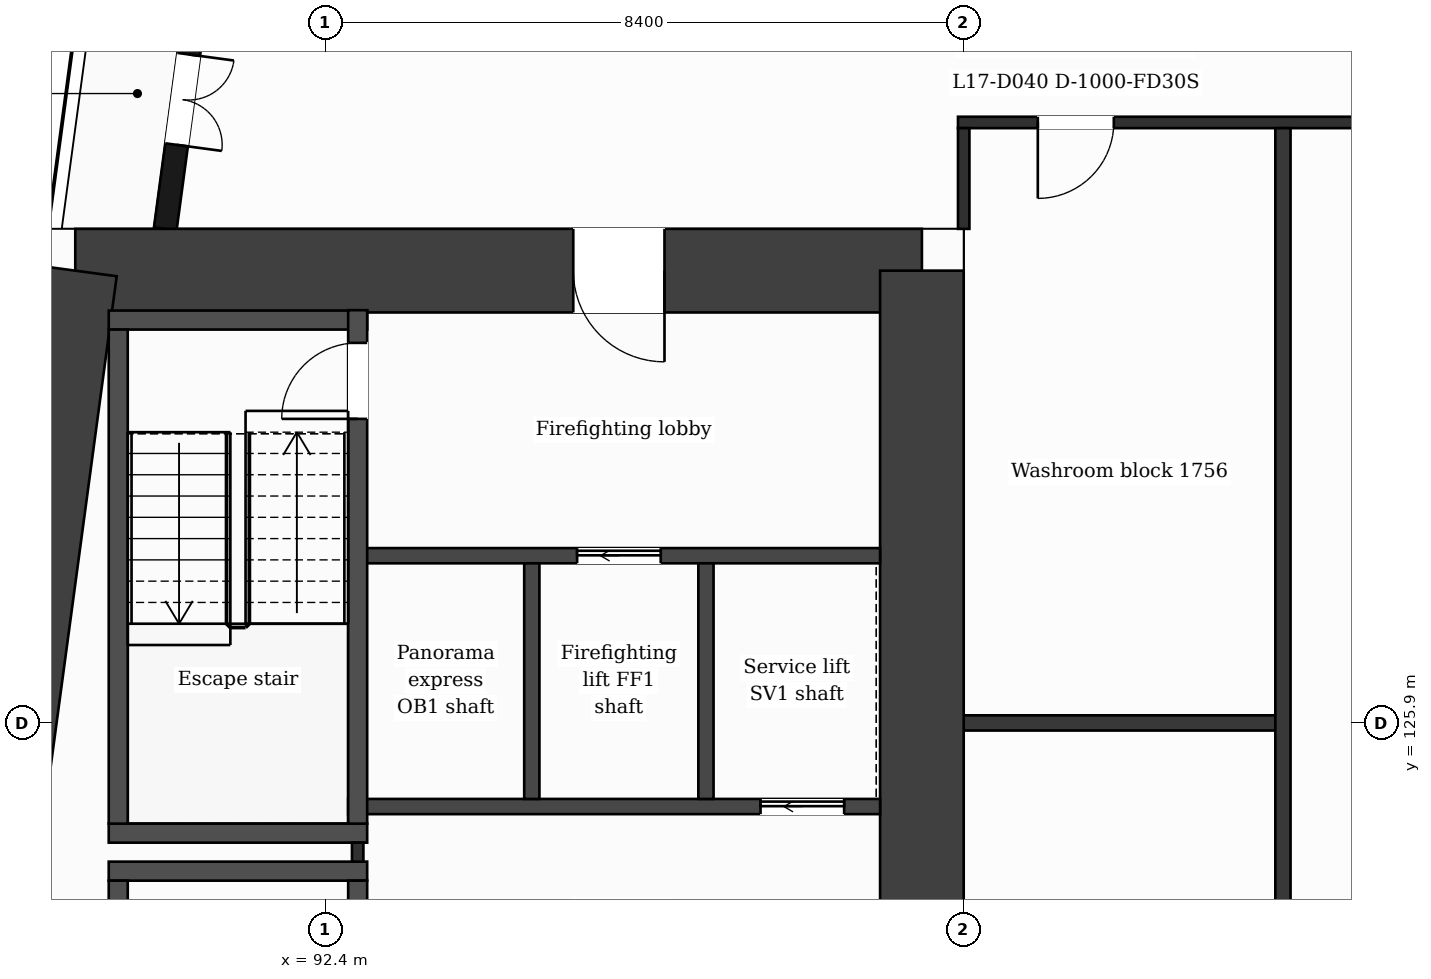
"""IFC4 building model, lengths in metres.
Left out: names, types, materials, properties, quantities, classifications, styles, units other than length and angle.
Written with IfcOpenShell. Run it as: python <this file> out.ifc"""

import sys

from ifc_helpers import new_model, si_unit, direction, frame, frame_2d, origin, place, context, subcontext, project, spatial, rectangle, extrude, element, fill, save


model = new_model("IFC4")
c1 = context("Model", 3, precision=1e-05, world=origin(), true_north=direction((0.0, 1.0)))
c2 = subcontext(c1, "Body", "Model", "MODEL_VIEW")
j1 = project(units=[si_unit("LENGTHUNIT", "METRE"), si_unit("PLANEANGLEUNIT", "RADIAN")], contexts=[c1])
p1 = place(None, origin())
s1 = spatial("IfcSite", under=j1, at=p1, CompositionType="ELEMENT")
p2 = place(p1, origin())
s2 = spatial("IfcBuilding", under=s1, at=p2, CompositionType="ELEMENT")
p3 = place(p2, frame((0.0, 0.0, 77.5)))
s3 = spatial("IfcBuildingStorey", under=s2, at=p3, CompositionType="ELEMENT", Elevation=77.5)
p4 = place(p3, frame((89.112, 131.85, 0.0), z_axis=(0.0, 0.0, 1.0), x_axis=(1.0, 0.0, 0.0)))
e1 = element("IfcWall", 1, at=p4, inside=s3, PredefinedType="SHEAR", context=c2, shape_type="SweptSolid", body=[
    extrude(rectangle(XDim=11.138, YDim=1.1, at=frame_2d((5.569, 0.0))), origin(), (0.0, 0.0, 1.0), 3.5),
])
p5 = place(p4, frame((6.552, 0.0, 0.0)))
e2 = element("IfcOpeningElement", 2, at=p5, cuts=e1, PredefinedType="OPENING", context=c2, shape_type="SweptSolid", body=[
    extrude(rectangle(XDim=1.2, YDim=2.1, at=frame_2d((0.6, 1.05))), frame((0.0, 0.56, 0.0), z_axis=(0.0, -1.0, 0.0), x_axis=(1.0, 0.0, 0.0)), (0.0, 0.0, 1.0), 1.12),
])
p6 = place(p3, frame((100.25, 131.85, 0.0), z_axis=(0.0, 0.0, 1.0), x_axis=(0.0, -1.0, 0.0)))
e3 = element("IfcWall", 3, at=p6, inside=s3, PredefinedType="SHEAR", context=c2, shape_type="SweptSolid", body=[
    extrude(rectangle(XDim=20.9, YDim=1.1, at=frame_2d((10.45, 0.0))), origin(), (0.0, 0.0, 1.0), 3.5),
])
p7 = place(p3, frame((86.298, 110.95, 0.0), z_axis=(0.0, 0.0, 1.0), x_axis=(0.133400422634, 0.99106222168, 0.0)))
e4 = element("IfcWall", 4, at=p7, inside=s3, PredefinedType="SHEAR", context=c2, shape_type="SweptSolid", body=[
    extrude(rectangle(XDim=21.089, YDim=1.1, at=frame_2d((10.544, 0.0))), origin(), (0.0, 0.0, 1.0), 3.5),
])
p8 = place(p3, frame((91.177, 138.95, 0.0), z_axis=(0.0, 0.0, 1.0), x_axis=(-0.133426664613, -0.991058689065, 0.0)))
e5 = element("IfcWall", 5, at=p8, inside=s3, PredefinedType="SOLIDWALL", context=c2, shape_type="SweptSolid", body=[
    extrude(rectangle(XDim=6.609, YDim=0.3, at=frame_2d((3.305, 0.0))), origin(), (0.0, 0.0, 1.0), 3.0),
])
p9 = place(p8, frame((1.039, 0.0, 0.9)))
e6 = element("IfcOpeningElement", 6, at=p9, cuts=e5, PredefinedType="OPENING", context=c2, shape_type="SweptSolid", body=[
    extrude(rectangle(XDim=1.2, YDim=2.1, at=frame_2d((0.6, 1.05))), frame((0.0, 0.16, 0.0), z_axis=(0.0, -1.0, 0.0), x_axis=(1.0, 0.0, 0.0)), (0.0, 0.0, 1.0), 0.32),
])
p10 = place(p8, frame((4.294, 0.0, 0.0)))
e7 = element("IfcOpeningElement", 7, at=p10, cuts=e5, PredefinedType="OPENING", context=c2, shape_type="SweptSolid", body=[
    extrude(rectangle(XDim=1.2, YDim=2.4, at=frame_2d((0.6, 1.2))), frame((0.0, 0.16, 0.0), z_axis=(0.0, -1.0, 0.0), x_axis=(1.0, 0.0, 0.0)), (0.0, 0.0, 1.0), 0.32),
])
for number, where, z_axis, x_axis in (
    (8, (89.552, 123.95, 0.0), (0.0, 0.0, 1.0), (1.0, 0.0, 0.0)),
    (9, (89.552, 124.45, 0.0), (0.0, 0.0, 1.0), (1.0, 0.0, 0.0)),
):
    element("IfcWall", number, at=place(p3, frame(where, z_axis=z_axis, x_axis=x_axis)), inside=s3, PredefinedType="PARTITIONING", context=c2, shape_type="SweptSolid", body=[
        extrude(rectangle(XDim=3.4, YDim=0.25, at=frame_2d((1.7, 0.0))), origin(), (0.0, 0.0, 1.0), 3.0),
    ])
p11 = place(p3, frame((92.702, 124.8, 0.0), z_axis=(0.0, 0.0, 1.0), x_axis=(1.0, 0.0, 0.0)))
e10 = element("IfcWall", 10, at=p11, inside=s3, PredefinedType="PARTITIONING", context=c2, shape_type="SweptSolid", body=[
    extrude(rectangle(XDim=6.998, YDim=0.2, at=frame_2d((3.499, 0.0))), origin(), (0.0, 0.0, 1.0), 3.0),
])
p12 = place(p11, frame((5.425, 0.0, 0.0)))
e11 = element("IfcOpeningElement", 11, at=p12, cuts=e10, PredefinedType="OPENING", context=c2, shape_type="SweptSolid", body=[
    extrude(rectangle(XDim=1.1, YDim=2.1, at=frame_2d((0.55, 1.05))), frame((0.0, 0.11, 0.0), z_axis=(0.0, -1.0, 0.0), x_axis=(1.0, 0.0, 0.0)), (0.0, 0.0, 1.0), 0.22),
])
p13 = place(p3, frame((100.8, 125.9, 0.0), z_axis=(0.0, 0.0, 1.0), x_axis=(1.0, 0.0, 0.0)))
e12 = element("IfcWall", 12, at=p13, inside=s3, PredefinedType="PARTITIONING", context=c2, shape_type="SweptSolid", body=[
    extrude(rectangle(XDim=4.2, YDim=0.2, at=frame_2d((2.1, 0.0))), origin(), (0.0, 0.0, 1.0), 3.0),
])
p14 = place(p3, frame((92.827, 128.1, 0.0), z_axis=(0.0, 0.0, 1.0), x_axis=(1.0, 0.0, 0.0)))
e13 = element("IfcWall", 13, at=p14, inside=s3, PredefinedType="PARTITIONING", context=c2, shape_type="SweptSolid", body=[
    extrude(rectangle(XDim=6.873, YDim=0.2, at=frame_2d((3.437, 0.0))), origin(), (0.0, 0.0, 1.0), 3.0),
])
p15 = place(p14, frame((2.887, 0.0, 0.0)))
e14 = element("IfcOpeningElement", 14, at=p15, cuts=e13, PredefinedType="OPENING", context=c2, shape_type="SweptSolid", body=[
    extrude(rectangle(XDim=1.1, YDim=2.1, at=frame_2d((0.55, 1.05))), frame((0.0, 0.11, 0.0), z_axis=(0.0, -1.0, 0.0), x_axis=(1.0, 0.0, 0.0)), (0.0, 0.0, 1.0), 0.22),
])
p16 = place(p3, frame((89.552, 131.2, 0.0), z_axis=(0.0, 0.0, 1.0), x_axis=(1.0, 0.0, 0.0)))
e15 = element("IfcWall", 15, at=p16, inside=s3, PredefinedType="PARTITIONING", context=c2, shape_type="SweptSolid", body=[
    extrude(rectangle(XDim=3.4, YDim=0.25, at=frame_2d((1.7, 0.0))), origin(), (0.0, 0.0, 1.0), 3.0),
])
p17 = place(p3, frame((100.725, 133.8, 0.0), z_axis=(0.0, 0.0, 1.0), x_axis=(1.0, 0.0, 0.0)))
e16 = element("IfcWall", 16, at=p17, inside=s3, PredefinedType="PARTITIONING", context=c2, shape_type="SweptSolid", body=[
    extrude(rectangle(XDim=25.35, YDim=0.15, at=frame_2d((12.675, 0.0))), origin(), (0.0, 0.0, 1.0), 3.0),
])
p18 = place(p17, frame((1.05, 0.0, 0.0)))
e17 = element("IfcOpeningElement", 17, at=p18, cuts=e16, PredefinedType="OPENING", context=c2, shape_type="SweptSolid", body=[
    extrude(rectangle(XDim=1.0, YDim=2.1, at=frame_2d((0.5, 1.05))), frame((0.0, 0.085, 0.0), z_axis=(0.0, -1.0, 0.0), x_axis=(1.0, 0.0, 0.0)), (0.0, 0.0, 1.0), 0.17),
])
p19 = place(p17, frame((12.175, 0.0, 0.0)))
e18 = element("IfcOpeningElement", 18, at=p19, cuts=e16, PredefinedType="OPENING", context=c2, shape_type="SweptSolid", body=[
    extrude(rectangle(XDim=1.0, YDim=2.1, at=frame_2d((0.5, 1.05))), frame((0.0, 0.085, 0.0), z_axis=(0.0, -1.0, 0.0), x_axis=(1.0, 0.0, 0.0)), (0.0, 0.0, 1.0), 0.17),
])
p20 = place(p17, frame((20.575, 0.0, 0.0)))
e19 = element("IfcOpeningElement", 19, at=p20, cuts=e16, PredefinedType="OPENING", context=c2, shape_type="SweptSolid", body=[
    extrude(rectangle(XDim=1.0, YDim=2.1, at=frame_2d((0.5, 1.05))), frame((0.0, 0.085, 0.0), z_axis=(0.0, -1.0, 0.0), x_axis=(1.0, 0.0, 0.0)), (0.0, 0.0, 1.0), 0.17),
])
p21 = place(p3, frame((89.677, 117.07, 0.0), z_axis=(0.0, 0.0, 1.0), x_axis=(0.0, 1.0, 0.0)))
e20 = element("IfcWall", 20, at=p21, inside=s3, PredefinedType="PARTITIONING", context=c2, shape_type="SweptSolid", body=[
    extrude(rectangle(XDim=6.755, YDim=0.25, at=frame_2d((3.377, 0.0))), origin(), (0.0, 0.0, 1.0), 3.0),
])
p22 = place(p3, frame((89.677, 124.575, 0.0), z_axis=(0.0, 0.0, 1.0), x_axis=(0.0, 1.0, 0.0)))
e21 = element("IfcWall", 21, at=p22, inside=s3, PredefinedType="PARTITIONING", context=c2, shape_type="SweptSolid", body=[
    extrude(rectangle(XDim=6.5, YDim=0.25, at=frame_2d((3.25, 0.0))), origin(), (0.0, 0.0, 1.0), 3.0),
])
p23 = place(p3, frame((92.827, 124.075, 0.0), z_axis=(0.0, 0.0, 1.0), x_axis=(0.0, 1.0, 0.0)))
e22 = element("IfcWall", 22, at=p23, inside=s3, PredefinedType="PARTITIONING", context=c2, shape_type="SweptSolid", body=[
    extrude(rectangle(XDim=0.25, YDim=0.15, at=frame_2d((0.125, 0.0))), origin(), (0.0, 0.0, 1.0), 3.0),
])
p24 = place(p3, frame((92.827, 117.07, 0.0), z_axis=(0.0, 0.0, 1.0), x_axis=(0.0, 1.0, 0.0)))
e23 = element("IfcWall", 23, at=p24, inside=s3, PredefinedType="PARTITIONING", context=c2, shape_type="SweptSolid", body=[
    extrude(rectangle(XDim=6.755, YDim=0.25, at=frame_2d((3.377, 0.0))), origin(), (0.0, 0.0, 1.0), 3.0),
])
p25 = place(p24, frame((5.455, 0.0, 0.0)))
e24 = element("IfcOpeningElement", 24, at=p25, cuts=e23, PredefinedType="OPENING", context=c2, shape_type="SweptSolid", body=[
    extrude(rectangle(XDim=0.95, YDim=2.1, at=frame_2d((0.475, 1.05))), frame((0.0, 0.135, 0.0), z_axis=(0.0, -1.0, 0.0), x_axis=(1.0, 0.0, 0.0)), (0.0, 0.0, 1.0), 0.27),
])
p26 = place(p3, frame((92.827, 124.575, 0.0), z_axis=(0.0, 0.0, 1.0), x_axis=(0.0, 1.0, 0.0)))
e25 = element("IfcWall", 25, at=p26, inside=s3, PredefinedType="PARTITIONING", context=c2, shape_type="SweptSolid", body=[
    extrude(rectangle(XDim=6.755, YDim=0.25, at=frame_2d((3.377, 0.0))), origin(), (0.0, 0.0, 1.0), 3.0),
])
p27 = place(p26, frame((5.325, 0.0, 0.0)))
e26 = element("IfcOpeningElement", 26, at=p27, cuts=e25, PredefinedType="OPENING", context=c2, shape_type="SweptSolid", body=[
    extrude(rectangle(XDim=1.0, YDim=2.1, at=frame_2d((0.5, 1.05))), frame((0.0, 0.135, 0.0), z_axis=(0.0, -1.0, 0.0), x_axis=(1.0, 0.0, 0.0)), (0.0, 0.0, 1.0), 0.27),
])
for number, where, z_axis, x_axis in (
    (27, (95.118, 124.9, 0.0), (0.0, 0.0, 1.0), (0.0, 1.0, 0.0)),
    (28, (97.409, 124.9, 0.0), (0.0, 0.0, 1.0), (0.0, 1.0, 0.0)),
):
    element("IfcWall", number, at=place(p3, frame(where, z_axis=z_axis, x_axis=x_axis)), inside=s3, PredefinedType="PARTITIONING", context=c2, shape_type="SweptSolid", body=[
        extrude(rectangle(XDim=3.1, YDim=0.2, at=frame_2d((1.55, 0.0))), origin(), (0.0, 0.0, 1.0), 3.0),
    ])
p28 = place(p3, frame((100.8, 132.4, 0.0), z_axis=(0.0, 0.0, 1.0), x_axis=(0.0, 1.0, 0.0)))
e29 = element("IfcWall", 29, at=p28, inside=s3, PredefinedType="PARTITIONING", context=c2, shape_type="SweptSolid", body=[
    extrude(rectangle(XDim=1.325, YDim=0.15, at=frame_2d((0.663, 0.0))), origin(), (0.0, 0.0, 1.0), 3.0),
])
p29 = place(p3, frame((105.0, 109.075, 0.0), z_axis=(0.0, 0.0, 1.0), x_axis=(0.0, 1.0, 0.0)))
e30 = element("IfcWall", 30, at=p29, inside=s3, PredefinedType="PARTITIONING", context=c2, shape_type="SweptSolid", body=[
    extrude(rectangle(XDim=24.65, YDim=0.2, at=frame_2d((12.325, 0.0))), origin(), (0.0, 0.0, 1.0), 3.0),
])
p30 = place(p10, origin())
e31 = element("IfcDoor", 31, at=p30, inside=s3, OperationType="DOUBLE_DOOR_SINGLE_SWING", PredefinedType="DOOR", context=c2, shape_type="SweptSolid", body=[
    extrude(rectangle(XDim=1.2, YDim=2.4, at=frame_2d((0.6, 1.2))), frame((0.0, 0.025, 0.0), z_axis=(0.0, -1.0, 0.0), x_axis=(1.0, 0.0, 0.0)), (0.0, 0.0, 1.0), 0.05),
])
fill(e7, e31)
p31 = place(p15, origin())
e32 = element("IfcDoor", 32, at=p31, inside=s3, OperationType="SLIDING_TO_LEFT", PredefinedType="DOOR", context=c2, shape_type="SweptSolid", body=[
    extrude(rectangle(XDim=1.1, YDim=2.1, at=frame_2d((0.55, 1.05))), frame((0.0, 0.025, 0.0), z_axis=(0.0, -1.0, 0.0), x_axis=(1.0, 0.0, 0.0)), (0.0, 0.0, 1.0), 0.05),
])
fill(e14, e32)
p32 = place(p12, origin())
e33 = element("IfcDoor", 33, at=p32, inside=s3, OperationType="SLIDING_TO_LEFT", PredefinedType="DOOR", context=c2, shape_type="SweptSolid", body=[
    extrude(rectangle(XDim=1.1, YDim=2.1, at=frame_2d((0.55, 1.05))), frame((0.0, 0.025, 0.0), z_axis=(0.0, -1.0, 0.0), x_axis=(1.0, 0.0, 0.0)), (0.0, 0.0, 1.0), 0.05),
])
fill(e11, e33)
p33 = place(p27, origin())
e34 = element("IfcDoor", 34, at=p33, inside=s3, OperationType="SINGLE_SWING_LEFT", PredefinedType="DOOR", context=c2, shape_type="SweptSolid", body=[
    extrude(rectangle(XDim=1.0, YDim=2.1, at=frame_2d((0.5, 1.05))), frame((0.0, 0.025, 0.0), z_axis=(0.0, -1.0, 0.0), x_axis=(1.0, 0.0, 0.0)), (0.0, 0.0, 1.0), 0.05),
])
fill(e26, e34)
p34 = place(p18, origin())
e35 = element("IfcDoor", 35, at=p34, inside=s3, OperationType="SINGLE_SWING_LEFT", PredefinedType="DOOR", context=c2, shape_type="SweptSolid", body=[
    extrude(rectangle(XDim=1.0, YDim=2.1, at=frame_2d((0.5, 1.05))), frame((0.0, 0.025, 0.0), z_axis=(0.0, -1.0, 0.0), x_axis=(1.0, 0.0, 0.0)), (0.0, 0.0, 1.0), 0.05),
])
fill(e17, e35)
p35 = place(p5, origin())
e36 = element("IfcDoor", 36, at=p35, inside=s3, OperationType="SINGLE_SWING_RIGHT", PredefinedType="DOOR", context=c2, shape_type="SweptSolid", body=[
    extrude(rectangle(XDim=1.2, YDim=2.1, at=frame_2d((0.6, 1.05))), frame((0.0, 0.025, 0.0), z_axis=(0.0, -1.0, 0.0), x_axis=(1.0, 0.0, 0.0)), (0.0, 0.0, 1.0), 0.05),
])
fill(e2, e36)
save(model, sys.argv[1])
